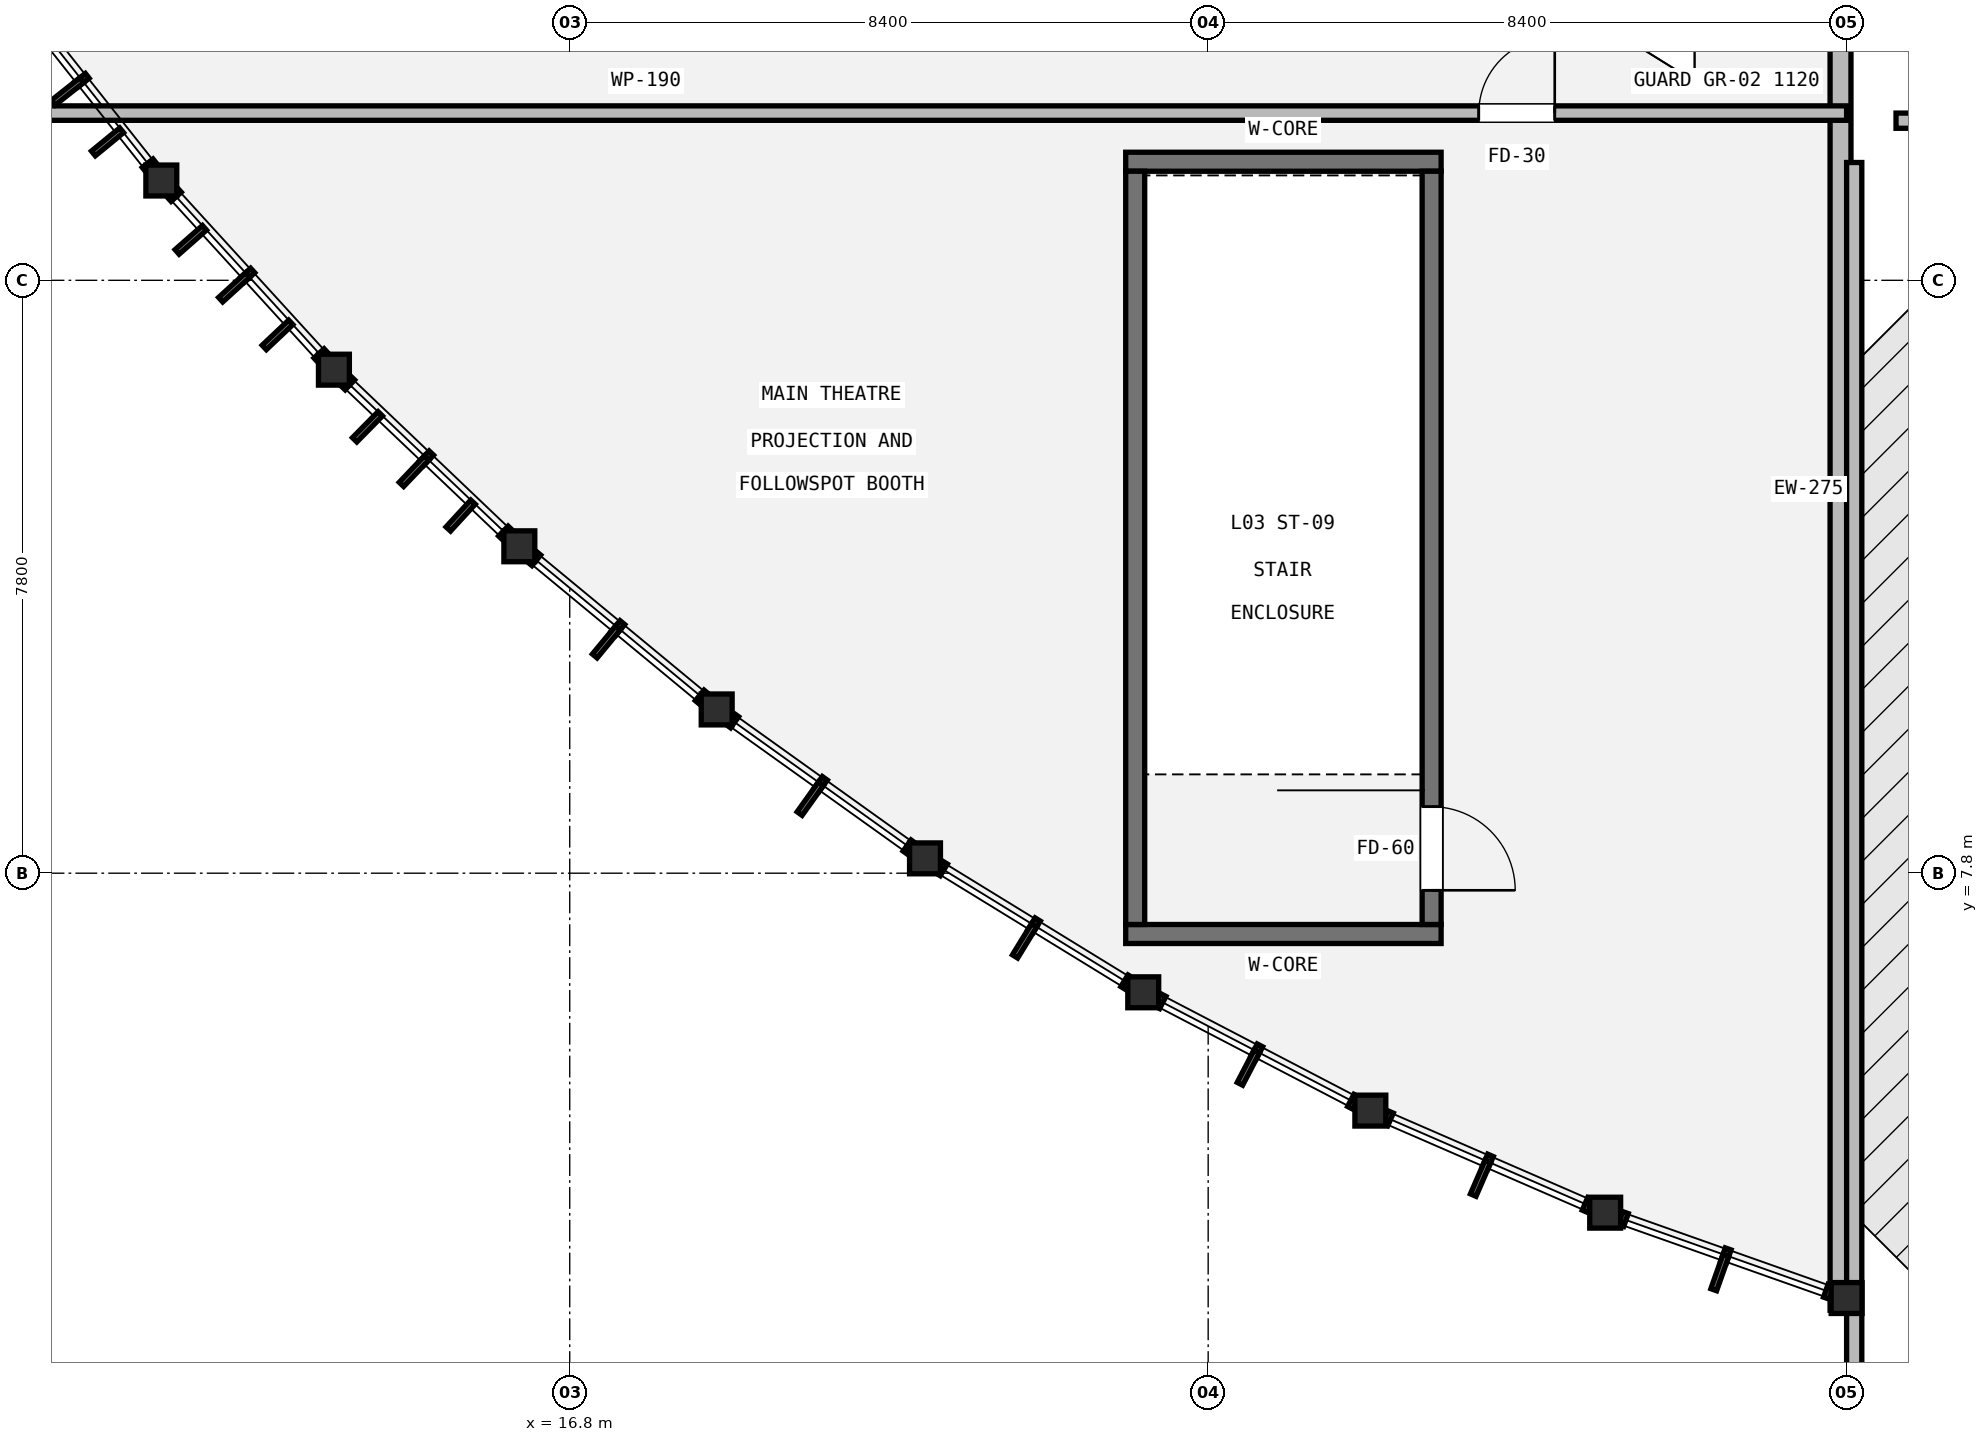
"""IFC4 building model, lengths in metres.
Left out: names, types, materials, properties, quantities, classifications, styles, units other than length and angle.
Written with IfcOpenShell. Run it as: python <this file> out.ifc"""

import sys

from ifc_helpers import new_model, si_unit, direction, frame, frame_2d, origin, origin_2d, place, context, subcontext, project, spatial, rectangle, hollow_circle, extrude, element, fill, save


model = new_model("IFC4")
c1 = context("Model", 3, precision=1e-05, world=origin(), true_north=direction((0.0, 1.0)))
c2 = subcontext(c1, "Body", "Model", "MODEL_VIEW")
j1 = project(units=[si_unit("LENGTHUNIT", "METRE"), si_unit("PLANEANGLEUNIT", "RADIAN")], contexts=[c1])
p1 = place(None, origin())
s1 = spatial("IfcSite", under=j1, at=p1, CompositionType="ELEMENT")
p2 = place(p1, origin())
s2 = spatial("IfcBuilding", under=s1, at=p2, CompositionType="ELEMENT")
p3 = place(p2, frame((0.0, 0.0, 15.0)))
s3 = spatial("IfcBuildingStorey", under=s2, at=p3, CompositionType="ELEMENT", Elevation=15.0)
for number, where, z_axis, x_axis in (
    (1, (11.427, 16.913, 0.0), (0.0, 0.0, 1.0), (1.0, 0.0, 0.0)),
    (2, (13.698, 14.424, 0.0), (0.0, 0.0, 1.0), (1.0, 0.0, 0.0)),
    (3, (16.137, 12.101, 0.0), (0.0, 0.0, 1.0), (1.0, 0.0, 0.0)),
    (4, (18.734, 9.954, 0.0), (0.0, 0.0, 1.0), (1.0, 0.0, 0.0)),
    (5, (21.474, 7.995, 0.0), (0.0, 0.0, 1.0), (1.0, 0.0, 0.0)),
    (6, (24.346, 6.233, 0.0), (0.0, 0.0, 1.0), (1.0, 0.0, 0.0)),
    (7, (27.334, 4.677, 0.0), (0.0, 0.0, 1.0), (1.0, 0.0, 0.0)),
    (8, (30.424, 3.334, 0.0), (0.0, 0.0, 1.0), (1.0, 0.0, 0.0)),
    (9, (33.6, 2.211, 0.0), (0.0, 0.0, 1.0), (1.0, 0.0, 0.0)),
):
    element("IfcColumn", number, at=place(p3, frame(where, z_axis=z_axis, x_axis=x_axis)), inside=s3, PredefinedType="COLUMN", context=c2, shape_type="SweptSolid", body=[
        extrude(hollow_circle(Radius=0.203, WallThickness=0.016, at=origin_2d()), origin(), (0.0, 0.0, 1.0), 4.2),
    ])
p4 = place(p3, frame((33.52, 2.05, 0.0), z_axis=(0.0, 0.0, 1.0), x_axis=(0.0, 1.0, 0.0)))
e10 = element("IfcWall", 10, at=p4, inside=s3, PredefinedType="STANDARD", context=c2, shape_type="SweptSolid", body=[
    extrude(rectangle(XDim=21.6, YDim=0.275, at=frame_2d((10.8, 0.0))), origin(), (0.0, 0.0, 1.0), 3.222),
])
p5 = place(p3, frame((116.95, 17.7, 0.0), z_axis=(0.0, 0.0, 1.0), x_axis=(-1.0, 0.0, 0.0)))
e11 = element("IfcWall", 11, at=p5, inside=s3, PredefinedType="PARAPET", context=c2, shape_type="SweptSolid", body=[
    extrude(rectangle(XDim=82.7, YDim=0.2, at=frame_2d((41.35, 0.0))), origin(), (0.0, 0.0, 1.0), 0.95),
])
p6 = place(p3, frame((33.7, 17.15, 0.0), z_axis=(0.0, 0.0, 1.0), x_axis=(0.0, -1.0, 0.0)))
e12 = element("IfcWall", 12, at=p6, inside=s3, PredefinedType="PARAPET", context=c2, shape_type="SweptSolid", body=[
    extrude(rectangle(XDim=16.5, YDim=0.2, at=frame_2d((8.25, 0.0))), origin(), (0.0, 0.0, 1.0), 0.95),
])
for number, where, z_axis, x_axis in (
    (13, (28.265, 7.0, 0.0), (0.0, 0.0, 1.0), (-1.0, 0.0, 0.0)),
    (14, (24.115, 17.16, 0.0), (0.0, 0.0, 1.0), (1.0, 0.0, 0.0)),
):
    element("IfcWall", number, at=place(p3, frame(where, z_axis=z_axis, x_axis=x_axis)), inside=s3, PredefinedType="SHEAR", context=c2, shape_type="SweptSolid", body=[
        extrude(rectangle(XDim=4.15, YDim=0.25, at=frame_2d((2.075, 0.0))), origin(), (0.0, 0.0, 1.0), 4.0),
    ])
p7 = place(p3, frame((24.24, 7.125, 0.0), z_axis=(0.0, 0.0, 1.0), x_axis=(0.0, 1.0, 0.0)))
e15 = element("IfcWall", 15, at=p7, inside=s3, PredefinedType="SHEAR", context=c2, shape_type="SweptSolid", body=[
    extrude(rectangle(XDim=9.91, YDim=0.25, at=frame_2d((4.955, 0.0))), origin(), (0.0, 0.0, 1.0), 4.0),
])
p8 = place(p3, frame((28.14, 17.035, 0.0), z_axis=(0.0, 0.0, 1.0), x_axis=(0.0, -1.0, 0.0)))
e16 = element("IfcWall", 16, at=p8, inside=s3, PredefinedType="SHEAR", context=c2, shape_type="SweptSolid", body=[
    extrude(rectangle(XDim=9.91, YDim=0.25, at=frame_2d((4.955, 0.0))), origin(), (0.0, 0.0, 1.0), 4.0),
])
p9 = place(p8, frame((8.36, 0.0, 0.0)))
e17 = element("IfcOpeningElement", 17, at=p9, cuts=e16, PredefinedType="OPENING", context=c2, shape_type="SweptSolid", body=[
    extrude(rectangle(XDim=1.1, YDim=2.15, at=frame_2d((0.55, 1.075))), frame((0.0, 0.135, 0.0), z_axis=(0.0, -1.0, 0.0), x_axis=(1.0, 0.0, 0.0)), (0.0, 0.0, 1.0), 0.27),
])
p10 = place(p3, frame((7.0, 17.8, 0.0), z_axis=(0.0, 0.0, 1.0), x_axis=(1.0, 0.0, 0.0)))
e18 = element("IfcWall", 18, at=p10, inside=s3, PredefinedType="PARTITIONING", context=c2, shape_type="SweptSolid", body=[
    extrude(rectangle(XDim=26.6, YDim=0.19, at=frame_2d((13.3, 0.0))), origin(), (0.0, 0.0, 1.0), 3.692),
])
p11 = place(p10, frame((21.76, 0.0, 0.0)))
e19 = element("IfcOpeningElement", 19, at=p11, cuts=e18, PredefinedType="OPENING", context=c2, shape_type="SweptSolid", body=[
    extrude(rectangle(XDim=1.0, YDim=2.1, at=frame_2d((0.5, 1.05))), frame((0.0, 0.105, 0.0), z_axis=(0.0, -1.0, 0.0), x_axis=(1.0, 0.0, 0.0)), (0.0, 0.0, 1.0), 0.21),
])
p12 = place(p9, origin())
e20 = element("IfcDoor", 20, at=p12, inside=s3, OperationType="SINGLE_SWING_RIGHT", PredefinedType="DOOR", context=c2, shape_type="SweptSolid", body=[
    extrude(rectangle(XDim=1.1, YDim=2.15, at=frame_2d((0.55, 1.075))), frame((0.0, 0.025, 0.0), z_axis=(0.0, -1.0, 0.0), x_axis=(1.0, 0.0, 0.0)), (0.0, 0.0, 1.0), 0.05),
])
fill(e17, e20)
p13 = place(p11, origin())
e21 = element("IfcDoor", 21, at=p13, inside=s3, OperationType="SINGLE_SWING_RIGHT", PredefinedType="DOOR", context=c2, shape_type="SweptSolid", body=[
    extrude(rectangle(XDim=1.0, YDim=2.1, at=frame_2d((0.5, 1.05))), frame((0.0, 0.025, 0.0), z_axis=(0.0, -1.0, 0.0), x_axis=(1.0, 0.0, 0.0)), (0.0, 0.0, 1.0), 0.05),
])
fill(e19, e21)
save(model, sys.argv[1])
